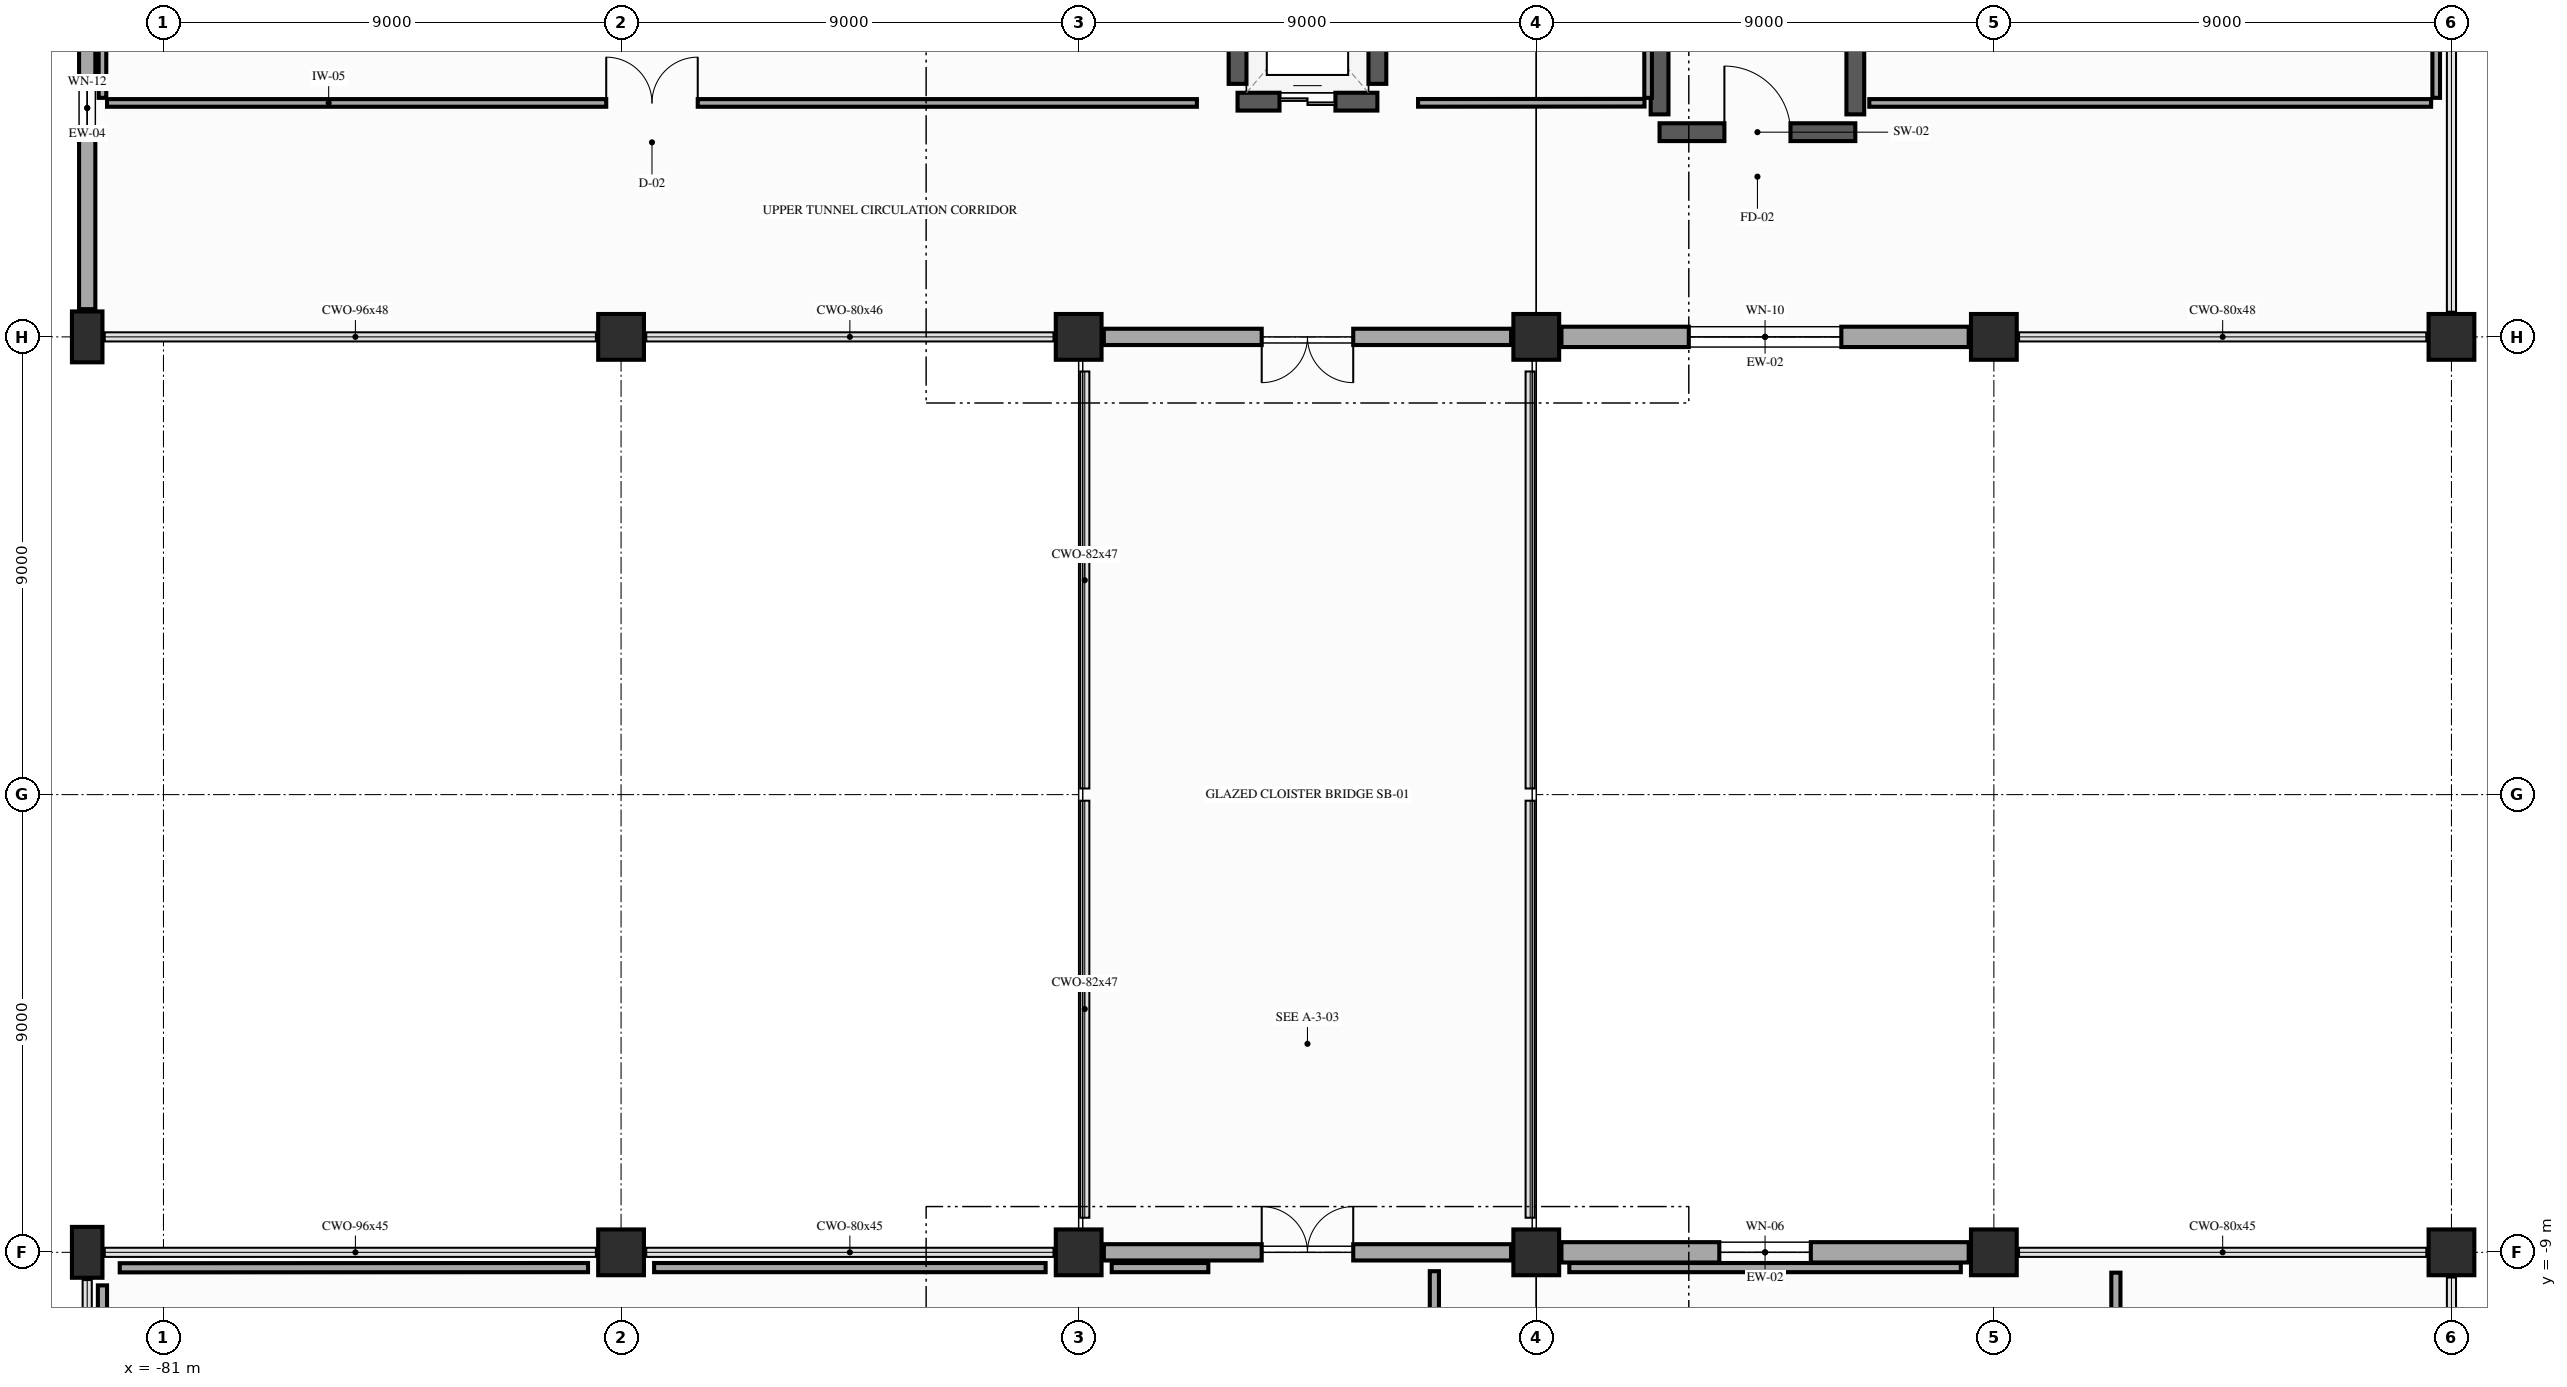
"""IFC4 building model, lengths in metres.
Left out: names, types, materials, properties, quantities, classifications, styles, units other than length and angle.
Written with IfcOpenShell. Run it as: python <this file> out.ifc"""

import sys

from ifc_helpers import new_model, si_unit, direction, frame, frame_2d, origin, origin_2d, place, context, subcontext, project, spatial, rectangle, extrude, element, fill, save


model = new_model("IFC4")
c1 = context("Model", 3, precision=1e-05, world=origin(), true_north=direction((0.0, 1.0)))
c2 = subcontext(c1, "Body", "Model", "MODEL_VIEW")
j1 = project(units=[si_unit("LENGTHUNIT", "METRE"), si_unit("PLANEANGLEUNIT", "RADIAN")], contexts=[c1])
p1 = place(None, origin())
s1 = spatial("IfcSite", under=j1, at=p1, CompositionType="ELEMENT")
p2 = place(p1, origin())
s2 = spatial("IfcBuilding", under=s1, at=p2, CompositionType="ELEMENT")
p3 = place(p2, frame((0.0, 0.0, 5.4)))
s3 = spatial("IfcBuildingStorey", under=s2, at=p3, CompositionType="ELEMENT", Elevation=5.4)
p4 = place(p3, frame((-82.5, 9.0, 0.0), z_axis=(0.0, 0.0, 1.0), x_axis=(1.0, 0.0, 0.0)))
e1 = element("IfcColumn", 1, at=p4, inside=s3, PredefinedType="PILASTER", context=c2, shape_type="SweptSolid", body=[
    extrude(rectangle(XDim=0.6, YDim=1.0, at=origin_2d()), origin(), (0.0, 0.0, 1.0), 5.4),
])
for number, where, z_axis, x_axis in (
    (2, (-72.0, 9.0, 0.0), (0.0, 0.0, 1.0), (1.0, 0.0, 0.0)),
    (3, (-63.0, 9.0, 0.0), (0.0, 0.0, 1.0), (1.0, 0.0, 0.0)),
    (4, (-54.0, 9.0, 0.0), (0.0, 0.0, 1.0), (1.0, 0.0, 0.0)),
    (5, (-45.0, 9.0, 0.0), (0.0, 0.0, 1.0), (1.0, 0.0, 0.0)),
    (6, (-36.0, 9.0, 0.0), (0.0, 0.0, 1.0), (1.0, 0.0, 0.0)),
):
    element("IfcColumn", number, at=place(p3, frame(where, z_axis=z_axis, x_axis=x_axis)), inside=s3, PredefinedType="COLUMN", context=c2, shape_type="SweptSolid", body=[
        extrude(rectangle(XDim=0.9, YDim=0.9, at=origin_2d()), origin(), (0.0, 0.0, 1.0), 5.4),
    ])
p5 = place(p3, frame((-82.5, -9.0, 0.0), z_axis=(0.0, 0.0, 1.0), x_axis=(1.0, 0.0, 0.0)))
e7 = element("IfcColumn", 7, at=p5, inside=s3, PredefinedType="PILASTER", context=c2, shape_type="SweptSolid", body=[
    extrude(rectangle(XDim=0.6, YDim=1.0, at=origin_2d()), origin(), (0.0, 0.0, 1.0), 5.4),
])
for number, where, z_axis, x_axis in (
    (8, (-72.0, -9.0, 0.0), (0.0, 0.0, 1.0), (1.0, 0.0, 0.0)),
    (9, (-63.0, -9.0, 0.0), (0.0, 0.0, 1.0), (1.0, 0.0, 0.0)),
    (10, (-54.0, -9.0, 0.0), (0.0, 0.0, 1.0), (1.0, 0.0, 0.0)),
    (11, (-45.0, -9.0, 0.0), (0.0, 0.0, 1.0), (1.0, 0.0, 0.0)),
    (12, (-36.0, -9.0, 0.0), (0.0, 0.0, 1.0), (1.0, 0.0, 0.0)),
):
    element("IfcColumn", number, at=place(p3, frame(where, z_axis=z_axis, x_axis=x_axis)), inside=s3, PredefinedType="COLUMN", context=c2, shape_type="SweptSolid", body=[
        extrude(rectangle(XDim=0.9, YDim=0.9, at=origin_2d()), origin(), (0.0, 0.0, 1.0), 5.4),
    ])
p6 = place(p3, frame((-45.495, 9.0, 0.0), z_axis=(0.0, 0.0, 1.0), x_axis=(-1.0, 0.0, 0.0)))
e13 = element("IfcWall", 13, at=p6, inside=s3, PredefinedType="SOLIDWALL", context=c2, shape_type="SweptSolid", body=[
    extrude(rectangle(XDim=8.01, YDim=0.4, at=frame_2d((4.005, 0.0))), origin(), (0.0, 0.0, 1.0), 4.575),
])
p7 = place(p6, frame((2.505, 0.0, 0.9)))
e14 = element("IfcOpeningElement", 14, at=p7, cuts=e13, PredefinedType="OPENING", context=c2, shape_type="SweptSolid", body=[
    extrude(rectangle(XDim=3.0, YDim=2.0, at=frame_2d((1.5, 1.0))), frame((0.0, 0.21, 0.0), z_axis=(0.0, -1.0, 0.0), x_axis=(1.0, 0.0, 0.0)), (0.0, 0.0, 1.0), 0.42),
])
p8 = place(p3, frame((-54.495, 9.0, 0.0), z_axis=(0.0, 0.0, 1.0), x_axis=(-1.0, 0.0, 0.0)))
e15 = element("IfcWall", 15, at=p8, inside=s3, PredefinedType="SOLIDWALL", context=c2, shape_type="SweptSolid", body=[
    extrude(rectangle(XDim=8.01, YDim=0.32, at=frame_2d((4.005, 0.0))), origin(), (0.0, 0.0, 1.0), 4.575),
])
p9 = place(p8, frame((3.105, 0.0, 0.0)))
e16 = element("IfcOpeningElement", 16, at=p9, cuts=e15, PredefinedType="OPENING", context=c2, shape_type="SweptSolid", body=[
    extrude(rectangle(XDim=1.8, YDim=2.2, at=frame_2d((0.9, 1.1))), frame((0.0, 0.17, 0.0), z_axis=(0.0, -1.0, 0.0), x_axis=(1.0, 0.0, 0.0)), (0.0, 0.0, 1.0), 0.34),
])
p10 = place(p3, frame((-82.5, 9.545, 0.0), z_axis=(0.0, 0.0, 1.0), x_axis=(0.0, 1.0, 0.0)))
e17 = element("IfcWall", 17, at=p10, inside=s3, PredefinedType="SOLIDWALL", context=c2, shape_type="SweptSolid", body=[
    extrude(rectangle(XDim=7.91, YDim=0.32, at=frame_2d((3.955, 0.0))), origin(), (0.0, 0.0, 1.0), 4.65),
])
p11 = place(p10, frame((3.43, 0.0, 0.9)))
e18 = element("IfcOpeningElement", 18, at=p11, cuts=e17, PredefinedType="OPENING", context=c2, shape_type="SweptSolid", body=[
    extrude(rectangle(XDim=1.05, YDim=2.0, at=frame_2d((0.525, 1.0))), frame((0.0, 0.17, 0.0), z_axis=(0.0, -1.0, 0.0), x_axis=(1.0, 0.0, 0.0)), (0.0, 0.0, 1.0), 0.34),
])
p12 = place(p3, frame((-62.505, -9.0, 0.0), z_axis=(0.0, 0.0, 1.0), x_axis=(1.0, 0.0, 0.0)))
e19 = element("IfcWall", 19, at=p12, inside=s3, PredefinedType="SOLIDWALL", context=c2, shape_type="SweptSolid", body=[
    extrude(rectangle(XDim=8.01, YDim=0.32, at=frame_2d((4.005, 0.0))), origin(), (0.0, 0.0, 1.0), 4.525),
])
p13 = place(p12, frame((3.105, 0.0, 0.0)))
e20 = element("IfcOpeningElement", 20, at=p13, cuts=e19, PredefinedType="OPENING", context=c2, shape_type="SweptSolid", body=[
    extrude(rectangle(XDim=1.8, YDim=2.2, at=frame_2d((0.9, 1.1))), frame((0.0, 0.17, 0.0), z_axis=(0.0, -1.0, 0.0), x_axis=(1.0, 0.0, 0.0)), (0.0, 0.0, 1.0), 0.34),
])
p14 = place(p3, frame((-53.505, -9.0, 0.0), z_axis=(0.0, 0.0, 1.0), x_axis=(1.0, 0.0, 0.0)))
e21 = element("IfcWall", 21, at=p14, inside=s3, PredefinedType="SOLIDWALL", context=c2, shape_type="SweptSolid", body=[
    extrude(rectangle(XDim=8.01, YDim=0.4, at=frame_2d((4.005, 0.0))), origin(), (0.0, 0.0, 1.0), 4.525),
])
p15 = place(p14, frame((3.105, 0.0, 0.9)))
e22 = element("IfcOpeningElement", 22, at=p15, cuts=e21, PredefinedType="OPENING", context=c2, shape_type="SweptSolid", body=[
    extrude(rectangle(XDim=1.8, YDim=2.2, at=frame_2d((0.9, 1.1))), frame((0.0, 0.21, 0.0), z_axis=(0.0, -1.0, 0.0), x_axis=(1.0, 0.0, 0.0)), (0.0, 0.0, 1.0), 0.42),
])
p16 = place(p3, frame((-51.575, 13.025, 0.0), z_axis=(0.0, 0.0, 1.0), x_axis=(1.0, 0.0, 0.0)))
e23 = element("IfcWall", 23, at=p16, inside=s3, PredefinedType="SHEAR", context=c2, shape_type="SweptSolid", body=[
    extrude(rectangle(XDim=3.85, YDim=0.35, at=frame_2d((1.925, 0.0))), origin(), (0.0, 0.0, 1.0), 5.15),
])
p17 = place(p16, frame((1.275, 0.0, 0.0)))
e24 = element("IfcOpeningElement", 24, at=p17, cuts=e23, PredefinedType="OPENING", context=c2, shape_type="SweptSolid", body=[
    extrude(rectangle(XDim=1.3, YDim=2.2, at=frame_2d((0.65, 1.1))), frame((0.0, 0.185, 0.0), z_axis=(0.0, -1.0, 0.0), x_axis=(1.0, 0.0, 0.0)), (0.0, 0.0, 1.0), 0.37),
])
for number, where, z_axis, x_axis in (
    (25, (-51.575, 13.375, 0.0), (0.0, 0.0, 1.0), (0.0, 1.0, 0.0)),
    (26, (-47.725, 13.375, 0.0), (0.0, 0.0, 1.0), (0.0, 1.0, 0.0)),
):
    element("IfcWall", number, at=place(p3, frame(where, z_axis=z_axis, x_axis=x_axis)), inside=s3, PredefinedType="SHEAR", context=c2, shape_type="SweptSolid", body=[
        extrude(rectangle(XDim=9.1, YDim=0.35, at=frame_2d((4.55, 0.0))), origin(), (0.0, 0.0, 1.0), 5.15),
    ])
p18 = place(p3, frame((-59.875, 13.625, 0.0), z_axis=(0.0, 0.0, 1.0), x_axis=(1.0, 0.0, 0.0)))
e27 = element("IfcWall", 27, at=p18, inside=s3, PredefinedType="SHEAR", context=c2, shape_type="SweptSolid", body=[
    extrude(rectangle(XDim=2.75, YDim=0.35, at=frame_2d((1.375, 0.0))), origin(), (0.0, 0.0, 1.0), 5.15),
])
p19 = place(p18, frame((0.825, 0.0, 0.0)))
e28 = element("IfcOpeningElement", 28, at=p19, cuts=e27, PredefinedType="OPENING", context=c2, shape_type="SweptSolid", body=[
    extrude(rectangle(XDim=1.1, YDim=2.2, at=frame_2d((0.55, 1.1))), frame((0.0, 0.185, 0.0), z_axis=(0.0, -1.0, 0.0), x_axis=(1.0, 0.0, 0.0)), (0.0, 0.0, 1.0), 0.37),
])
for number, where, z_axis, x_axis in (
    (29, (-59.875, 13.975, 0.0), (0.0, 0.0, 1.0), (0.0, 1.0, 0.0)),
    (30, (-57.125, 13.975, 0.0), (0.0, 0.0, 1.0), (0.0, 1.0, 0.0)),
):
    element("IfcWall", number, at=place(p3, frame(where, z_axis=z_axis, x_axis=x_axis)), inside=s3, PredefinedType="SHEAR", context=c2, shape_type="SweptSolid", body=[
        extrude(rectangle(XDim=2.45, YDim=0.35, at=frame_2d((1.225, 0.0))), origin(), (0.0, 0.0, 1.0), 5.15),
    ])
p20 = place(p3, frame((-82.2, 17.35, 0.0), z_axis=(0.0, 0.0, 1.0), x_axis=(0.0, -1.0, 0.0)))
e31 = element("IfcWall", 31, at=p20, inside=s3, PredefinedType="PARTITIONING", context=c2, shape_type="SweptSolid", body=[
    extrude(rectangle(XDim=3.65, YDim=0.15, at=frame_2d((1.825, 0.0))), origin(), (0.0, 0.0, 1.0), 4.785),
])
p21 = place(p3, frame((-82.11, 13.6, 0.0), z_axis=(0.0, 0.0, 1.0), x_axis=(1.0, 0.0, 0.0)))
e32 = element("IfcWall", 32, at=p21, inside=s3, PredefinedType="PARTITIONING", context=c2, shape_type="SweptSolid", body=[
    extrude(rectangle(XDim=21.435, YDim=0.15, at=frame_2d((10.718, 0.0))), origin(), (0.0, 0.0, 1.0), 4.635),
])
p22 = place(p21, frame((9.818, 0.0, 0.0)))
e33 = element("IfcOpeningElement", 33, at=p22, cuts=e32, PredefinedType="OPENING", context=c2, shape_type="SweptSolid", body=[
    extrude(rectangle(XDim=1.8, YDim=2.3, at=frame_2d((0.9, 1.15))), frame((0.0, 0.085, 0.0), z_axis=(0.0, -1.0, 0.0), x_axis=(1.0, 0.0, 0.0)), (0.0, 0.0, 1.0), 0.17),
])
p23 = place(p3, frame((-56.325, 13.601, 0.0), z_axis=(0.0, 0.0, 1.0), x_axis=(0.999999783658, 0.000657786406, 0.0)))
e34 = element("IfcWall", 34, at=p23, inside=s3, PredefinedType="PARTITIONING", context=c2, shape_type="SweptSolid", body=[
    extrude(rectangle(XDim=4.454, YDim=0.15, at=frame_2d((2.227, 0.0))), origin(), (0.0, 0.0, 1.0), 4.635),
])
p24 = place(p3, frame((-51.8, 13.7, 0.0), z_axis=(0.0, 0.0, 1.0), x_axis=(-0.000302131905, 0.999999954358, 0.0)))
e35 = element("IfcWall", 35, at=p24, inside=s3, PredefinedType="PARTITIONING", context=c2, shape_type="SweptSolid", body=[
    extrude(rectangle(XDim=12.929, YDim=0.15, at=frame_2d((6.464, 0.0))), origin(), (0.0, 0.0, 1.0), 4.785),
])
p25 = place(p24, frame((9.443, 0.0, 0.0)))
e36 = element("IfcOpeningElement", 36, at=p25, cuts=e35, PredefinedType="OPENING", context=c2, shape_type="SweptSolid", body=[
    extrude(rectangle(XDim=1.8, YDim=2.3, at=frame_2d((0.9, 1.15))), frame((0.0, 0.085, 0.0), z_axis=(0.0, -1.0, 0.0), x_axis=(1.0, 0.0, 0.0)), (0.0, 0.0, 1.0), 0.17),
])
p26 = place(p3, frame((-47.45, 13.6, 0.0), z_axis=(0.0, 0.0, 1.0), x_axis=(1.0, 0.0, 0.0)))
e37 = element("IfcWall", 37, at=p26, inside=s3, PredefinedType="PARTITIONING", context=c2, shape_type="SweptSolid", body=[
    extrude(rectangle(XDim=11.05, YDim=0.15, at=frame_2d((5.525, 0.0))), origin(), (0.0, 0.0, 1.0), 4.785),
])
p27 = place(p3, frame((-36.3, 13.7, 0.0), z_axis=(0.0, 0.0, 1.0), x_axis=(0.0, 1.0, 0.0)))
e38 = element("IfcWall", 38, at=p27, inside=s3, PredefinedType="PARTITIONING", context=c2, shape_type="SweptSolid", body=[
    extrude(rectangle(XDim=3.65, YDim=0.15, at=frame_2d((1.825, 0.0))), origin(), (0.0, 0.0, 1.0), 4.785),
])
p28 = place(p3, frame((-56.0, -22.7, 0.0), z_axis=(0.0, 0.0, 1.0), x_axis=(-0.000293067118, 0.999999957056, 0.0)))
e39 = element("IfcWall", 39, at=p28, inside=s3, PredefinedType="PARTITIONING", context=c2, shape_type="SweptSolid", body=[
    extrude(rectangle(XDim=13.329, YDim=0.18, at=frame_2d((6.665, 0.0))), origin(), (0.0, 0.0, 1.0), 4.525),
])
p29 = place(p28, frame((2.066, 0.0, 0.0)))
e40 = element("IfcOpeningElement", 40, at=p29, cuts=e39, PredefinedType="OPENING", context=c2, shape_type="SweptSolid", body=[
    extrude(rectangle(XDim=1.2, YDim=2.2, at=frame_2d((0.6, 1.1))), frame((0.0, 0.1, 0.0), z_axis=(0.0, -1.0, 0.0), x_axis=(1.0, 0.0, 0.0)), (0.0, 0.0, 1.0), 0.2),
])
p30 = place(p3, frame((-60.45, -9.3, 0.0), z_axis=(0.0, 0.0, 1.0), x_axis=(-1.0, 0.0, 0.0)))
e41 = element("IfcWall", 41, at=p30, inside=s3, PredefinedType="PARTITIONING", context=c2, shape_type="SweptSolid", body=[
    extrude(rectangle(XDim=1.9, YDim=0.18, at=frame_2d((0.95, 0.0))), origin(), (0.0, 0.0, 1.0), 4.525),
])
p31 = place(p3, frame((-63.65, -9.3, 0.0), z_axis=(0.0, 0.0, 1.0), x_axis=(-1.0, 0.0, 0.0)))
e42 = element("IfcWall", 42, at=p31, inside=s3, PredefinedType="PARTITIONING", context=c2, shape_type="SweptSolid", body=[
    extrude(rectangle(XDim=7.7, YDim=0.18, at=frame_2d((3.85, 0.0))), origin(), (0.0, 0.0, 1.0), 4.525),
])
p32 = place(p3, frame((-72.65, -9.3, 0.0), z_axis=(0.0, 0.0, 1.0), x_axis=(-0.99999991006, -0.000424121897, 0.0)))
e43 = element("IfcWall", 43, at=p32, inside=s3, PredefinedType="PARTITIONING", context=c2, shape_type="SweptSolid", body=[
    extrude(rectangle(XDim=9.21, YDim=0.18, at=frame_2d((4.605, 0.0))), origin(), (0.0, 0.0, 1.0), 4.525),
])
p33 = place(p3, frame((-82.2, -9.65, 0.0), z_axis=(0.0, 0.0, 1.0), x_axis=(0.0, -1.0, 0.0)))
e44 = element("IfcWall", 44, at=p33, inside=s3, PredefinedType="PARTITIONING", context=c2, shape_type="SweptSolid", body=[
    extrude(rectangle(XDim=7.7, YDim=0.18, at=frame_2d((3.85, 0.0))), origin(), (0.0, 0.0, 1.0), 4.525),
])
p34 = place(p3, frame((-42.6, -22.7, 0.0), z_axis=(0.0, 0.0, 1.0), x_axis=(0.0, 1.0, 0.0)))
e45 = element("IfcWall", 45, at=p34, inside=s3, PredefinedType="PARTITIONING", context=c2, shape_type="SweptSolid", body=[
    extrude(rectangle(XDim=13.3, YDim=0.18, at=frame_2d((6.65, 0.0))), origin(), (0.0, 0.0, 1.0), 4.525),
])
p35 = place(p3, frame((-45.65, -9.3, 0.0), z_axis=(0.0, 0.0, 1.0), x_axis=(-1.0, 0.0, 0.0)))
e46 = element("IfcWall", 46, at=p35, inside=s3, PredefinedType="PARTITIONING", context=c2, shape_type="SweptSolid", body=[
    extrude(rectangle(XDim=7.7, YDim=0.18, at=frame_2d((3.85, 0.0))), origin(), (0.0, 0.0, 1.0), 4.525),
])
p36 = place(p7, origin())
e47 = element("IfcWindow", 47, at=p36, inside=s3, PartitioningType="SINGLE_PANEL", PredefinedType="WINDOW", context=c2, shape_type="SweptSolid", body=[
    extrude(rectangle(XDim=3.0, YDim=2.0, at=frame_2d((1.5, 1.0))), frame((0.0, 0.03, 0.0), z_axis=(0.0, -1.0, 0.0), x_axis=(1.0, 0.0, 0.0)), (0.0, 0.0, 1.0), 0.06),
])
fill(e14, e47)
p37 = place(p9, origin())
e48 = element("IfcDoor", 48, at=p37, inside=s3, OperationType="DOUBLE_DOOR_SINGLE_SWING", PredefinedType="DOOR", context=c2, shape_type="SweptSolid", body=[
    extrude(rectangle(XDim=1.8, YDim=2.2, at=frame_2d((0.9, 1.1))), frame((0.0, 0.025, 0.0), z_axis=(0.0, -1.0, 0.0), x_axis=(1.0, 0.0, 0.0)), (0.0, 0.0, 1.0), 0.05),
])
fill(e16, e48)
p38 = place(p11, origin())
e49 = element("IfcWindow", 49, at=p38, inside=s3, PartitioningType="SINGLE_PANEL", PredefinedType="WINDOW", context=c2, shape_type="SweptSolid", body=[
    extrude(rectangle(XDim=1.05, YDim=2.0, at=frame_2d((0.525, 1.0))), frame((0.0, 0.03, 0.0), z_axis=(0.0, -1.0, 0.0), x_axis=(1.0, 0.0, 0.0)), (0.0, 0.0, 1.0), 0.06),
])
fill(e18, e49)
p39 = place(p13, origin())
e50 = element("IfcDoor", 50, at=p39, inside=s3, OperationType="DOUBLE_DOOR_SINGLE_SWING", PredefinedType="DOOR", context=c2, shape_type="SweptSolid", body=[
    extrude(rectangle(XDim=1.8, YDim=2.2, at=frame_2d((0.9, 1.1))), frame((0.0, 0.025, 0.0), z_axis=(0.0, -1.0, 0.0), x_axis=(1.0, 0.0, 0.0)), (0.0, 0.0, 1.0), 0.05),
])
fill(e20, e50)
p40 = place(p15, origin())
e51 = element("IfcWindow", 51, at=p40, inside=s3, PartitioningType="SINGLE_PANEL", PredefinedType="WINDOW", context=c2, shape_type="SweptSolid", body=[
    extrude(rectangle(XDim=1.8, YDim=2.2, at=frame_2d((0.9, 1.1))), frame((0.0, 0.03, 0.0), z_axis=(0.0, -1.0, 0.0), x_axis=(1.0, 0.0, 0.0)), (0.0, 0.0, 1.0), 0.06),
])
fill(e22, e51)
p41 = place(p17, origin())
e52 = element("IfcDoor", 52, at=p41, inside=s3, OperationType="SINGLE_SWING_LEFT", PredefinedType="DOOR", context=c2, shape_type="SweptSolid", body=[
    extrude(rectangle(XDim=1.3, YDim=2.2, at=frame_2d((0.65, 1.1))), frame((0.0, 0.025, 0.0), z_axis=(0.0, -1.0, 0.0), x_axis=(1.0, 0.0, 0.0)), (0.0, 0.0, 1.0), 0.05),
])
fill(e24, e52)
p42 = place(p19, origin())
e53 = element("IfcDoor", 53, at=p42, inside=s3, OperationType="DOUBLE_DOOR_SLIDING", PredefinedType="DOOR", context=c2, shape_type="SweptSolid", body=[
    extrude(rectangle(XDim=1.1, YDim=2.2, at=frame_2d((0.55, 1.1))), frame((0.0, 0.025, 0.0), z_axis=(0.0, -1.0, 0.0), x_axis=(1.0, 0.0, 0.0)), (0.0, 0.0, 1.0), 0.05),
])
fill(e28, e53)
p43 = place(p22, origin())
e54 = element("IfcDoor", 54, at=p43, inside=s3, OperationType="DOUBLE_DOOR_SINGLE_SWING", PredefinedType="DOOR", context=c2, shape_type="SweptSolid", body=[
    extrude(rectangle(XDim=1.8, YDim=2.3, at=frame_2d((0.9, 1.15))), frame((0.0, 0.025, 0.0), z_axis=(0.0, -1.0, 0.0), x_axis=(1.0, 0.0, 0.0)), (0.0, 0.0, 1.0), 0.05),
])
fill(e33, e54)
save(model, sys.argv[1])
